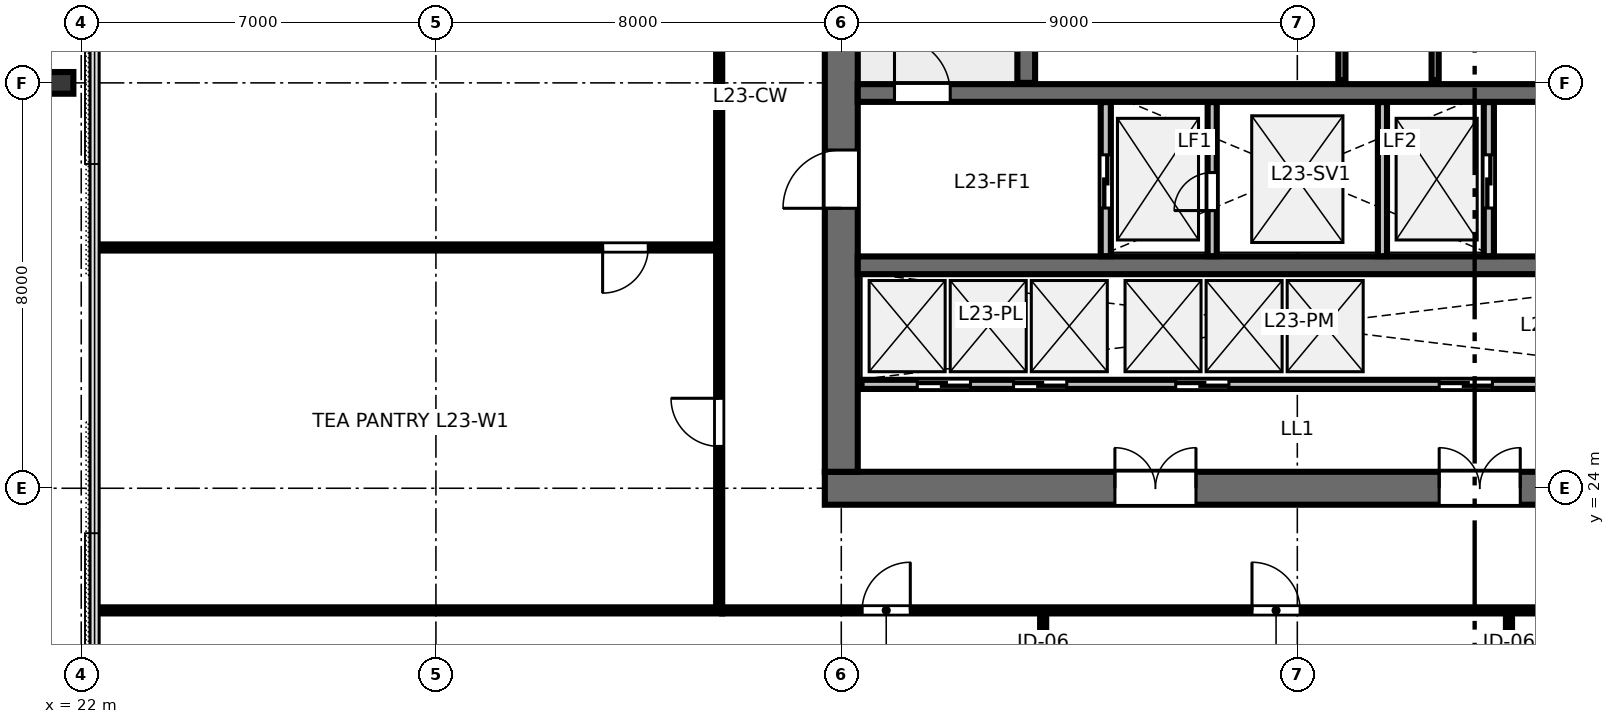
"""IFC4 building model, lengths in metres.
Left out: names, types, materials, properties, quantities, classifications, styles, units other than length and angle.
Written with IfcOpenShell. Run it as: python <this file> out.ifc"""

import sys

from ifc_helpers import new_model, si_unit, direction, frame, frame_2d, origin, origin_2d, place, context, subcontext, project, spatial, rectangle, i_section, extrude, element, fill, save


model = new_model("IFC4")
c1 = context("Model", 3, precision=1e-05, world=origin(), true_north=direction((0.0, 1.0)))
c2 = subcontext(c1, "Body", "Model", "MODEL_VIEW")
j1 = project(units=[si_unit("LENGTHUNIT", "METRE"), si_unit("PLANEANGLEUNIT", "RADIAN")], contexts=[c1])
p1 = place(None, origin())
s1 = spatial("IfcSite", under=j1, at=p1, CompositionType="ELEMENT")
p2 = place(p1, origin())
s2 = spatial("IfcBuilding", under=s1, at=p2, CompositionType="ELEMENT")
p3 = place(p2, frame((0.0, 0.0, 90.4)))
s3 = spatial("IfcBuildingStorey", under=s2, at=p3, CompositionType="ELEMENT", Elevation=90.4)
p4 = place(p3, frame((36.675, 24.0, 0.0), z_axis=(0.0, 0.0, 1.0), x_axis=(1.0, 0.0, 0.0)))
e1 = element("IfcWall", 1, at=p4, inside=s3, PredefinedType="SHEAR", context=c2, shape_type="SweptSolid", body=[
    extrude(rectangle(XDim=18.65, YDim=0.65, at=frame_2d((9.325, 0.0))), origin(), (0.0, 0.0, 1.0), 4.56),
])
p5 = place(p4, frame((5.725, 0.0, 0.0)))
e2 = element("IfcOpeningElement", 2, at=p5, cuts=e1, PredefinedType="OPENING", context=c2, shape_type="SweptSolid", body=[
    extrude(rectangle(XDim=1.6, YDim=2.15, at=frame_2d((0.8, 1.075))), frame((0.0, 0.335, 0.0), z_axis=(0.0, -1.0, 0.0), x_axis=(1.0, 0.0, 0.0)), (0.0, 0.0, 1.0), 0.67),
])
p6 = place(p4, frame((12.125, 0.0, 0.0)))
e3 = element("IfcOpeningElement", 3, at=p6, cuts=e1, PredefinedType="OPENING", context=c2, shape_type="SweptSolid", body=[
    extrude(rectangle(XDim=1.6, YDim=2.15, at=frame_2d((0.8, 1.075))), frame((0.0, 0.335, 0.0), z_axis=(0.0, -1.0, 0.0), x_axis=(1.0, 0.0, 0.0)), (0.0, 0.0, 1.0), 0.67),
])
p7 = place(p3, frame((37.0, 24.325, 0.0), z_axis=(0.0, 0.0, 1.0), x_axis=(0.0, 1.0, 0.0)))
e4 = element("IfcWall", 4, at=p7, inside=s3, PredefinedType="SHEAR", context=c2, shape_type="SweptSolid", body=[
    extrude(rectangle(XDim=15.35, YDim=0.65, at=frame_2d((7.675, 0.0))), origin(), (0.0, 0.0, 1.0), 4.56),
])
p8 = place(p7, frame((5.2, 0.0, 0.0)))
e5 = element("IfcOpeningElement", 5, at=p8, cuts=e4, PredefinedType="OPENING", context=c2, shape_type="SweptSolid", body=[
    extrude(rectangle(XDim=1.15, YDim=2.15, at=frame_2d((0.575, 1.075))), frame((0.0, 0.335, 0.0), z_axis=(0.0, -1.0, 0.0), x_axis=(1.0, 0.0, 0.0)), (0.0, 0.0, 1.0), 0.67),
])
p9 = place(p3, frame((37.325, 31.8, 0.0), z_axis=(0.0, 0.0, 1.0), x_axis=(1.0, 0.0, 0.0)))
e6 = element("IfcWall", 6, at=p9, inside=s3, PredefinedType="SHEAR", context=c2, shape_type="SweptSolid", body=[
    extrude(rectangle(XDim=17.35, YDim=0.35, at=frame_2d((8.675, 0.0))), origin(), (0.0, 0.0, 1.0), 4.56),
])
p10 = place(p9, frame((0.725, 0.0, 0.0)))
e7 = element("IfcOpeningElement", 7, at=p10, cuts=e6, PredefinedType="OPENING", context=c2, shape_type="SweptSolid", body=[
    extrude(rectangle(XDim=1.1, YDim=2.15, at=frame_2d((0.55, 1.075))), frame((0.0, 0.185, 0.0), z_axis=(0.0, -1.0, 0.0), x_axis=(1.0, 0.0, 0.0)), (0.0, 0.0, 1.0), 0.37),
])
p11 = place(p9, frame((14.625, 0.0, 0.0)))
e8 = element("IfcOpeningElement", 8, at=p11, cuts=e6, PredefinedType="OPENING", context=c2, shape_type="SweptSolid", body=[
    extrude(rectangle(XDim=1.1, YDim=2.15, at=frame_2d((0.55, 1.075))), frame((0.0, 0.185, 0.0), z_axis=(0.0, -1.0, 0.0), x_axis=(1.0, 0.0, 0.0)), (0.0, 0.0, 1.0), 0.37),
])
p12 = place(p3, frame((37.325, 28.4, 0.0), z_axis=(0.0, 0.0, 1.0), x_axis=(1.0, 0.0, 0.0)))
e9 = element("IfcWall", 9, at=p12, inside=s3, PredefinedType="SHEAR", context=c2, shape_type="SweptSolid", body=[
    extrude(rectangle(XDim=17.35, YDim=0.35, at=frame_2d((8.675, 0.0))), origin(), (0.0, 0.0, 1.0), 4.56),
])
p13 = place(p3, frame((21.603, 32.0, 0.0), z_axis=(0.047509227082, 0.0, 0.998870799124), x_axis=(-0.998870799124, 0.0, 0.047509227082)))
e10 = element("IfcColumn", 10, at=p13, inside=s3, PredefinedType="COLUMN", context=c2, shape_type="SweptSolid", body=[
    extrude(i_section(OverallWidth=0.428, OverallDepth=0.483, WebThickness=0.051, FlangeThickness=0.082, FilletRadius=0.025, at=origin_2d()), origin(), (0.0, 0.0, 1.0), 4.563),
])
p14 = place(p3, frame((40.65, 32.0, 0.0), z_axis=(0.0, 0.0, 1.0), x_axis=(0.0, 1.0, 0.0)))
e11 = element("IfcWall", 11, at=p14, inside=s3, PredefinedType="SHEAR", context=c2, shape_type="SweptSolid", body=[
    extrude(rectangle(XDim=7.7, YDim=0.35, at=frame_2d((3.85, 0.0))), origin(), (0.0, 0.0, 1.0), 4.8),
])
p15 = place(p3, frame((46.88, 32.05, 0.0), z_axis=(0.0, 0.0, 1.0), x_axis=(0.0, 1.0, 0.0)))
e12 = element("IfcWall", 12, at=p15, inside=s3, PredefinedType="PARTITIONING", context=c2, shape_type="SweptSolid", body=[
    extrude(rectangle(XDim=7.6, YDim=0.14, at=frame_2d((3.8, 0.0))), origin(), (0.0, 0.0, 1.0), 4.56),
])
p16 = place(p15, frame((3.4, 0.0, 0.0)))
e13 = element("IfcOpeningElement", 13, at=p16, cuts=e12, PredefinedType="OPENING", context=c2, shape_type="SweptSolid", body=[
    extrude(rectangle(XDim=0.95, YDim=2.15, at=frame_2d((0.475, 1.075))), frame((0.0, 0.08, 0.0), z_axis=(0.0, -1.0, 0.0), x_axis=(1.0, 0.0, 0.0)), (0.0, 0.0, 1.0), 0.16),
])
p17 = place(p3, frame((48.72, 32.05, 0.0), z_axis=(0.0, 0.0, 1.0), x_axis=(0.0, 1.0, 0.0)))
e14 = element("IfcWall", 14, at=p17, inside=s3, PredefinedType="PARTITIONING", context=c2, shape_type="SweptSolid", body=[
    extrude(rectangle(XDim=7.6, YDim=0.14, at=frame_2d((3.8, 0.0))), origin(), (0.0, 0.0, 1.0), 4.56),
])
p18 = place(p17, frame((0.8, 0.0, 0.0)))
e15 = element("IfcOpeningElement", 15, at=p18, cuts=e14, PredefinedType="OPENING", context=c2, shape_type="SweptSolid", body=[
    extrude(rectangle(XDim=0.9, YDim=2.15, at=frame_2d((0.45, 1.075))), frame((0.0, 0.08, 0.0), z_axis=(0.0, -1.0, 0.0), x_axis=(1.0, 0.0, 0.0)), (0.0, 0.0, 1.0), 0.16),
])
p19 = place(p17, frame((3.35, 0.0, 0.0)))
e16 = element("IfcOpeningElement", 16, at=p19, cuts=e14, PredefinedType="OPENING", context=c2, shape_type="SweptSolid", body=[
    extrude(rectangle(XDim=0.9, YDim=2.15, at=frame_2d((0.45, 1.075))), frame((0.0, 0.08, 0.0), z_axis=(0.0, -1.0, 0.0), x_axis=(1.0, 0.0, 0.0)), (0.0, 0.0, 1.0), 0.16),
])
p20 = place(p17, frame((5.9, 0.0, 0.0)))
e17 = element("IfcOpeningElement", 17, at=p20, cuts=e14, PredefinedType="OPENING", context=c2, shape_type="SweptSolid", body=[
    extrude(rectangle(XDim=0.92, YDim=2.15, at=frame_2d((0.46, 1.075))), frame((0.0, 0.08, 0.0), z_axis=(0.0, -1.0, 0.0), x_axis=(1.0, 0.0, 0.0)), (0.0, 0.0, 1.0), 0.16),
])
p21 = place(p3, frame((42.22, 28.58, 0.0), z_axis=(0.0, 0.0, 1.0), x_axis=(0.0, 1.0, 0.0)))
e18 = element("IfcWall", 18, at=p21, inside=s3, PredefinedType="PARTITIONING", context=c2, shape_type="SweptSolid", body=[
    extrude(rectangle(XDim=3.04, YDim=0.2, at=frame_2d((1.52, 0.0))), origin(), (0.0, 0.0, 1.0), 4.56),
])
p22 = place(p21, frame((0.95, 0.0, 0.0)))
e19 = element("IfcOpeningElement", 19, at=p22, cuts=e18, PredefinedType="OPENING", context=c2, shape_type="SweptSolid", body=[
    extrude(rectangle(XDim=1.05, YDim=2.15, at=frame_2d((0.525, 1.075))), frame((0.0, 0.11, 0.0), z_axis=(0.0, -1.0, 0.0), x_axis=(1.0, 0.0, 0.0)), (0.0, 0.0, 1.0), 0.22),
])
p23 = place(p3, frame((49.78, 28.58, 0.0), z_axis=(0.0, 0.0, 1.0), x_axis=(0.0, 1.0, 0.0)))
e20 = element("IfcWall", 20, at=p23, inside=s3, PredefinedType="PARTITIONING", context=c2, shape_type="SweptSolid", body=[
    extrude(rectangle(XDim=3.04, YDim=0.2, at=frame_2d((1.52, 0.0))), origin(), (0.0, 0.0, 1.0), 4.56),
])
p24 = place(p23, frame((0.95, 0.0, 0.0)))
e21 = element("IfcOpeningElement", 21, at=p24, cuts=e20, PredefinedType="OPENING", context=c2, shape_type="SweptSolid", body=[
    extrude(rectangle(XDim=1.05, YDim=2.15, at=frame_2d((0.525, 1.075))), frame((0.0, 0.11, 0.0), z_axis=(0.0, -1.0, 0.0), x_axis=(1.0, 0.0, 0.0)), (0.0, 0.0, 1.0), 0.22),
])
p25 = place(p3, frame((44.32, 28.58, 0.0), z_axis=(0.0, 0.0, 1.0), x_axis=(0.0, 1.0, 0.0)))
e22 = element("IfcWall", 22, at=p25, inside=s3, PredefinedType="PARTITIONING", context=c2, shape_type="SweptSolid", body=[
    extrude(rectangle(XDim=3.04, YDim=0.18, at=frame_2d((1.52, 0.0))), origin(), (0.0, 0.0, 1.0), 4.56),
])
p26 = place(p25, frame((0.9, 0.0, 0.0)))
e23 = element("IfcOpeningElement", 23, at=p26, cuts=e22, PredefinedType="OPENING", context=c2, shape_type="SweptSolid", body=[
    extrude(rectangle(XDim=0.75, YDim=2.0, at=frame_2d((0.375, 1.0))), frame((0.0, 0.1, 0.0), z_axis=(0.0, -1.0, 0.0), x_axis=(1.0, 0.0, 0.0)), (0.0, 0.0, 1.0), 0.2),
])
p27 = place(p3, frame((47.68, 28.58, 0.0), z_axis=(0.0, 0.0, 1.0), x_axis=(0.0, 1.0, 0.0)))
e24 = element("IfcWall", 24, at=p27, inside=s3, PredefinedType="PARTITIONING", context=c2, shape_type="SweptSolid", body=[
    extrude(rectangle(XDim=3.04, YDim=0.18, at=frame_2d((1.52, 0.0))), origin(), (0.0, 0.0, 1.0), 4.56),
])
p28 = place(p3, frame((37.4, 26.05, 0.0), z_axis=(0.0, 0.0, 1.0), x_axis=(1.0, 0.0, 0.0)))
e25 = element("IfcWall", 25, at=p28, inside=s3, PredefinedType="PARTITIONING", context=c2, shape_type="SweptSolid", body=[
    extrude(rectangle(XDim=17.2, YDim=0.18, at=frame_2d((8.6, 0.0))), origin(), (0.0, 0.0, 1.0), 4.56),
])
p29 = place(p28, frame((1.1, 0.0, 0.0)))
e26 = element("IfcOpeningElement", 26, at=p29, cuts=e25, PredefinedType="OPENING", context=c2, shape_type="SweptSolid", body=[
    extrude(rectangle(XDim=1.05, YDim=2.15, at=frame_2d((0.525, 1.075))), frame((0.0, 0.1, 0.0), z_axis=(0.0, -1.0, 0.0), x_axis=(1.0, 0.0, 0.0)), (0.0, 0.0, 1.0), 0.2),
])
p30 = place(p28, frame((3.0, 0.0, 0.0)))
e27 = element("IfcOpeningElement", 27, at=p30, cuts=e25, PredefinedType="OPENING", context=c2, shape_type="SweptSolid", body=[
    extrude(rectangle(XDim=1.05, YDim=2.15, at=frame_2d((0.525, 1.075))), frame((0.0, 0.1, 0.0), z_axis=(0.0, -1.0, 0.0), x_axis=(1.0, 0.0, 0.0)), (0.0, 0.0, 1.0), 0.2),
])
p31 = place(p28, frame((11.4, 0.0, 0.0)))
e28 = element("IfcOpeningElement", 28, at=p31, cuts=e25, PredefinedType="OPENING", context=c2, shape_type="SweptSolid", body=[
    extrude(rectangle(XDim=1.05, YDim=2.15, at=frame_2d((0.525, 1.075))), frame((0.0, 0.1, 0.0), z_axis=(0.0, -1.0, 0.0), x_axis=(1.0, 0.0, 0.0)), (0.0, 0.0, 1.0), 0.2),
])
p32 = place(p28, frame((6.2, 0.0, 0.0)))
e29 = element("IfcOpeningElement", 29, at=p32, cuts=e25, PredefinedType="OPENING", context=c2, shape_type="SweptSolid", body=[
    extrude(rectangle(XDim=1.05, YDim=2.15, at=frame_2d((0.525, 1.075))), frame((0.0, 0.1, 0.0), z_axis=(0.0, -1.0, 0.0), x_axis=(1.0, 0.0, 0.0)), (0.0, 0.0, 1.0), 0.2),
])
p33 = place(p3, frame((40.984, 21.59, 0.0), z_axis=(0.0, 0.0, 1.0), x_axis=(0.0, -1.0, 0.0)))
e30 = element("IfcWall", 30, at=p33, inside=s3, PredefinedType="MOVABLE", context=c2, shape_type="SweptSolid", body=[
    extrude(rectangle(XDim=10.493, YDim=0.12, at=frame_2d((5.247, 0.0))), origin(), (0.0, 0.0, 1.0), 3.84),
])
p34 = place(p33, frame((1.4, 0.0, 0.0)))
e31 = element("IfcOpeningElement", 31, at=p34, cuts=e30, PredefinedType="OPENING", context=c2, shape_type="SweptSolid", body=[
    extrude(rectangle(XDim=0.9, YDim=2.15, at=frame_2d((0.45, 1.075))), frame((0.0, 0.07, 0.0), z_axis=(0.0, -1.0, 0.0), x_axis=(1.0, 0.0, 0.0)), (0.0, 0.0, 1.0), 0.14),
])
p35 = place(p3, frame((50.177, 21.59, 0.0), z_axis=(0.0, 0.0, 1.0), x_axis=(0.0, -1.0, 0.0)))
e32 = element("IfcWall", 32, at=p35, inside=s3, PredefinedType="PARTITIONING", context=c2, shape_type="SweptSolid", body=[
    extrude(rectangle(XDim=10.493, YDim=0.12, at=frame_2d((5.247, 0.0))), origin(), (0.0, 0.0, 1.0), 3.84),
])
p36 = place(p35, frame((1.4, 0.0, 0.0)))
e33 = element("IfcOpeningElement", 33, at=p36, cuts=e32, PredefinedType="OPENING", context=c2, shape_type="SweptSolid", body=[
    extrude(rectangle(XDim=0.9, YDim=2.15, at=frame_2d((0.45, 1.075))), frame((0.0, 0.07, 0.0), z_axis=(0.0, -1.0, 0.0), x_axis=(1.0, 0.0, 0.0)), (0.0, 0.0, 1.0), 0.14),
])
p37 = place(p3, frame((34.65, 21.59, 0.0), z_axis=(0.0, 0.0, 1.0), x_axis=(1.0, 0.0, 0.0)))
e34 = element("IfcWall", 34, at=p37, inside=s3, PredefinedType="PARTITIONING", context=c2, shape_type="SweptSolid", body=[
    extrude(rectangle(XDim=22.7, YDim=0.12, at=frame_2d((11.35, 0.0))), origin(), (0.0, 0.0, 1.0), 3.84),
])
p38 = place(p37, frame((2.762, 0.0, 0.0)))
e35 = element("IfcOpeningElement", 35, at=p38, cuts=e34, PredefinedType="OPENING", context=c2, shape_type="SweptSolid", body=[
    extrude(rectangle(XDim=0.95, YDim=2.15, at=frame_2d((0.475, 1.075))), frame((0.0, 0.07, 0.0), z_axis=(0.0, -1.0, 0.0), x_axis=(1.0, 0.0, 0.0)), (0.0, 0.0, 1.0), 0.14),
])
p39 = place(p37, frame((10.456, 0.0, 0.0)))
e36 = element("IfcOpeningElement", 36, at=p39, cuts=e34, PredefinedType="OPENING", context=c2, shape_type="SweptSolid", body=[
    extrude(rectangle(XDim=0.95, YDim=2.15, at=frame_2d((0.475, 1.075))), frame((0.0, 0.07, 0.0), z_axis=(0.0, -1.0, 0.0), x_axis=(1.0, 0.0, 0.0)), (0.0, 0.0, 1.0), 0.14),
])
p40 = place(p37, frame((18.569, 0.0, 0.0)))
e37 = element("IfcOpeningElement", 37, at=p40, cuts=e34, PredefinedType="OPENING", context=c2, shape_type="SweptSolid", body=[
    extrude(rectangle(XDim=0.95, YDim=2.15, at=frame_2d((0.475, 1.075))), frame((0.0, 0.07, 0.0), z_axis=(0.0, -1.0, 0.0), x_axis=(1.0, 0.0, 0.0)), (0.0, 0.0, 1.0), 0.14),
])
p41 = place(p3, frame((34.59, 28.752, 0.0), z_axis=(0.0, 0.0, 1.0), x_axis=(-1.0, 0.0, 0.0)))
e38 = element("IfcWall", 38, at=p41, inside=s3, PredefinedType="PARTITIONING", context=c2, shape_type="SweptSolid", body=[
    extrude(rectangle(XDim=12.327, YDim=0.12, at=frame_2d((6.164, 0.0))), origin(), (0.0, 0.0, 1.0), 3.84),
])
p42 = place(p41, frame((1.4, 0.0, 0.0)))
e39 = element("IfcOpeningElement", 39, at=p42, cuts=e38, PredefinedType="OPENING", context=c2, shape_type="SweptSolid", body=[
    extrude(rectangle(XDim=0.9, YDim=2.15, at=frame_2d((0.45, 1.075))), frame((0.0, 0.07, 0.0), z_axis=(0.0, -1.0, 0.0), x_axis=(1.0, 0.0, 0.0)), (0.0, 0.0, 1.0), 0.14),
])
p43 = place(p3, frame((34.59, 21.65, 0.0), z_axis=(0.0, 0.0, 1.0), x_axis=(0.0, 1.0, 0.0)))
e40 = element("IfcWall", 40, at=p43, inside=s3, PredefinedType="PARTITIONING", context=c2, shape_type="SweptSolid", body=[
    extrude(rectangle(XDim=20.7, YDim=0.12, at=frame_2d((10.35, 0.0))), origin(), (0.0, 0.0, 1.0), 3.84),
])
p44 = place(p43, frame((3.176, 0.0, 0.0)))
e41 = element("IfcOpeningElement", 41, at=p44, cuts=e40, PredefinedType="OPENING", context=c2, shape_type="SweptSolid", body=[
    extrude(rectangle(XDim=0.95, YDim=2.15, at=frame_2d((0.475, 1.075))), frame((0.0, 0.07, 0.0), z_axis=(0.0, -1.0, 0.0), x_axis=(1.0, 0.0, 0.0)), (0.0, 0.0, 1.0), 0.14),
])
p45 = place(p43, frame((11.116, 0.0, 0.0)))
e42 = element("IfcOpeningElement", 42, at=p45, cuts=e40, PredefinedType="OPENING", context=c2, shape_type="SweptSolid", body=[
    extrude(rectangle(XDim=0.95, YDim=2.15, at=frame_2d((0.475, 1.075))), frame((0.0, 0.07, 0.0), z_axis=(0.0, -1.0, 0.0), x_axis=(1.0, 0.0, 0.0)), (0.0, 0.0, 1.0), 0.14),
])
p46 = place(p43, frame((17.815, 0.0, 0.0)))
e43 = element("IfcOpeningElement", 43, at=p46, cuts=e40, PredefinedType="OPENING", context=c2, shape_type="SweptSolid", body=[
    extrude(rectangle(XDim=0.95, YDim=2.15, at=frame_2d((0.475, 1.075))), frame((0.0, 0.07, 0.0), z_axis=(0.0, -1.0, 0.0), x_axis=(1.0, 0.0, 0.0)), (0.0, 0.0, 1.0), 0.14),
])
p47 = place(p3, frame((34.65, 21.59, 0.0), z_axis=(0.0, 0.0, 1.0), x_axis=(-1.0, 0.0, 0.0)))
e44 = element("IfcWall", 44, at=p47, inside=s3, PredefinedType="PARTITIONING", context=c2, shape_type="SweptSolid", body=[
    extrude(rectangle(XDim=12.387, YDim=0.12, at=frame_2d((6.193, 0.0))), origin(), (0.0, 0.0, 1.0), 3.84),
])
p48 = place(p10, origin())
e45 = element("IfcDoor", 45, at=p48, inside=s3, OperationType="SINGLE_SWING_LEFT", PredefinedType="DOOR", context=c2, shape_type="SweptSolid", body=[
    extrude(rectangle(XDim=1.1, YDim=2.15, at=frame_2d((0.55, 1.075))), frame((0.0, 0.025, 0.0), z_axis=(0.0, -1.0, 0.0), x_axis=(1.0, 0.0, 0.0)), (0.0, 0.0, 1.0), 0.05),
])
fill(e7, e45)
p49 = place(p8, origin())
e46 = element("IfcDoor", 46, at=p49, inside=s3, OperationType="SINGLE_SWING_LEFT", PredefinedType="DOOR", context=c2, shape_type="SweptSolid", body=[
    extrude(rectangle(XDim=1.15, YDim=2.15, at=frame_2d((0.575, 1.075))), frame((0.0, 0.025, 0.0), z_axis=(0.0, -1.0, 0.0), x_axis=(1.0, 0.0, 0.0)), (0.0, 0.0, 1.0), 0.05),
])
fill(e5, e46)
p50 = place(p5, origin())
e47 = element("IfcDoor", 47, at=p50, inside=s3, OperationType="DOUBLE_DOOR_SINGLE_SWING", PredefinedType="DOOR", context=c2, shape_type="SweptSolid", body=[
    extrude(rectangle(XDim=1.6, YDim=2.15, at=frame_2d((0.8, 1.075))), frame((0.0, 0.025, 0.0), z_axis=(0.0, -1.0, 0.0), x_axis=(1.0, 0.0, 0.0)), (0.0, 0.0, 1.0), 0.05),
])
fill(e2, e47)
p51 = place(p6, origin())
e48 = element("IfcDoor", 48, at=p51, inside=s3, OperationType="DOUBLE_DOOR_SINGLE_SWING", PredefinedType="DOOR", context=c2, shape_type="SweptSolid", body=[
    extrude(rectangle(XDim=1.6, YDim=2.15, at=frame_2d((0.8, 1.075))), frame((0.0, 0.025, 0.0), z_axis=(0.0, -1.0, 0.0), x_axis=(1.0, 0.0, 0.0)), (0.0, 0.0, 1.0), 0.05),
])
fill(e3, e48)
p52 = place(p22, origin())
e49 = element("IfcDoor", 49, at=p52, inside=s3, OperationType="SLIDING_TO_LEFT", PredefinedType="DOOR", context=c2, shape_type="SweptSolid", body=[
    extrude(rectangle(XDim=1.05, YDim=2.15, at=frame_2d((0.525, 1.075))), frame((0.0, 0.025, 0.0), z_axis=(0.0, -1.0, 0.0), x_axis=(1.0, 0.0, 0.0)), (0.0, 0.0, 1.0), 0.05),
])
fill(e19, e49)
p53 = place(p24, origin())
e50 = element("IfcDoor", 50, at=p53, inside=s3, OperationType="SLIDING_TO_RIGHT", PredefinedType="DOOR", context=c2, shape_type="SweptSolid", body=[
    extrude(rectangle(XDim=1.05, YDim=2.15, at=frame_2d((0.525, 1.075))), frame((0.0, 0.025, 0.0), z_axis=(0.0, -1.0, 0.0), x_axis=(1.0, 0.0, 0.0)), (0.0, 0.0, 1.0), 0.05),
])
fill(e21, e50)
p54 = place(p29, origin())
e51 = element("IfcDoor", 51, at=p54, inside=s3, OperationType="SLIDING_TO_LEFT", PredefinedType="DOOR", context=c2, shape_type="SweptSolid", body=[
    extrude(rectangle(XDim=1.05, YDim=2.15, at=frame_2d((0.525, 1.075))), frame((0.0, 0.025, 0.0), z_axis=(0.0, -1.0, 0.0), x_axis=(1.0, 0.0, 0.0)), (0.0, 0.0, 1.0), 0.05),
])
fill(e26, e51)
p55 = place(p30, origin())
e52 = element("IfcDoor", 52, at=p55, inside=s3, OperationType="SLIDING_TO_RIGHT", PredefinedType="DOOR", context=c2, shape_type="SweptSolid", body=[
    extrude(rectangle(XDim=1.05, YDim=2.15, at=frame_2d((0.525, 1.075))), frame((0.0, 0.025, 0.0), z_axis=(0.0, -1.0, 0.0), x_axis=(1.0, 0.0, 0.0)), (0.0, 0.0, 1.0), 0.05),
])
fill(e27, e52)
p56 = place(p31, origin())
e53 = element("IfcDoor", 53, at=p56, inside=s3, OperationType="SLIDING_TO_LEFT", PredefinedType="DOOR", context=c2, shape_type="SweptSolid", body=[
    extrude(rectangle(XDim=1.05, YDim=2.15, at=frame_2d((0.525, 1.075))), frame((0.0, 0.025, 0.0), z_axis=(0.0, -1.0, 0.0), x_axis=(1.0, 0.0, 0.0)), (0.0, 0.0, 1.0), 0.05),
])
fill(e28, e53)
p57 = place(p32, origin())
e54 = element("IfcDoor", 54, at=p57, inside=s3, OperationType="SLIDING_TO_LEFT", PredefinedType="DOOR", context=c2, shape_type="SweptSolid", body=[
    extrude(rectangle(XDim=1.05, YDim=2.15, at=frame_2d((0.525, 1.075))), frame((0.0, 0.025, 0.0), z_axis=(0.0, -1.0, 0.0), x_axis=(1.0, 0.0, 0.0)), (0.0, 0.0, 1.0), 0.05),
])
fill(e29, e54)
p58 = place(p38, origin())
e55 = element("IfcDoor", 55, at=p58, inside=s3, OperationType="SINGLE_SWING_RIGHT", PredefinedType="DOOR", context=c2, shape_type="SweptSolid", body=[
    extrude(rectangle(XDim=0.95, YDim=2.15, at=frame_2d((0.475, 1.075))), frame((0.0, 0.025, 0.0), z_axis=(0.0, -1.0, 0.0), x_axis=(1.0, 0.0, 0.0)), (0.0, 0.0, 1.0), 0.05),
])
fill(e35, e55)
p59 = place(p39, origin())
e56 = element("IfcDoor", 56, at=p59, inside=s3, OperationType="SINGLE_SWING_LEFT", PredefinedType="DOOR", context=c2, shape_type="SweptSolid", body=[
    extrude(rectangle(XDim=0.95, YDim=2.15, at=frame_2d((0.475, 1.075))), frame((0.0, 0.025, 0.0), z_axis=(0.0, -1.0, 0.0), x_axis=(1.0, 0.0, 0.0)), (0.0, 0.0, 1.0), 0.05),
])
fill(e36, e56)
p60 = place(p42, origin())
e57 = element("IfcDoor", 57, at=p60, inside=s3, OperationType="SINGLE_SWING_RIGHT", PredefinedType="DOOR", context=c2, shape_type="SweptSolid", body=[
    extrude(rectangle(XDim=0.9, YDim=2.15, at=frame_2d((0.45, 1.075))), frame((0.0, 0.025, 0.0), z_axis=(0.0, -1.0, 0.0), x_axis=(1.0, 0.0, 0.0)), (0.0, 0.0, 1.0), 0.05),
])
fill(e39, e57)
p61 = place(p44, origin())
e58 = element("IfcDoor", 58, at=p61, inside=s3, OperationType="SINGLE_SWING_RIGHT", PredefinedType="DOOR", context=c2, shape_type="SweptSolid", body=[
    extrude(rectangle(XDim=0.95, YDim=2.15, at=frame_2d((0.475, 1.075))), frame((0.0, 0.025, 0.0), z_axis=(0.0, -1.0, 0.0), x_axis=(1.0, 0.0, 0.0)), (0.0, 0.0, 1.0), 0.05),
])
fill(e41, e58)
p62 = place(p26, origin())
e59 = element("IfcDoor", 59, at=p62, inside=s3, OperationType="SINGLE_SWING_LEFT", PredefinedType="TRAPDOOR", context=c2, shape_type="SweptSolid", body=[
    extrude(rectangle(XDim=0.75, YDim=2.0, at=frame_2d((0.375, 1.0))), frame((0.0, 0.025, 0.0), z_axis=(0.0, -1.0, 0.0), x_axis=(1.0, 0.0, 0.0)), (0.0, 0.0, 1.0), 0.05),
])
fill(e23, e59)
save(model, sys.argv[1])
